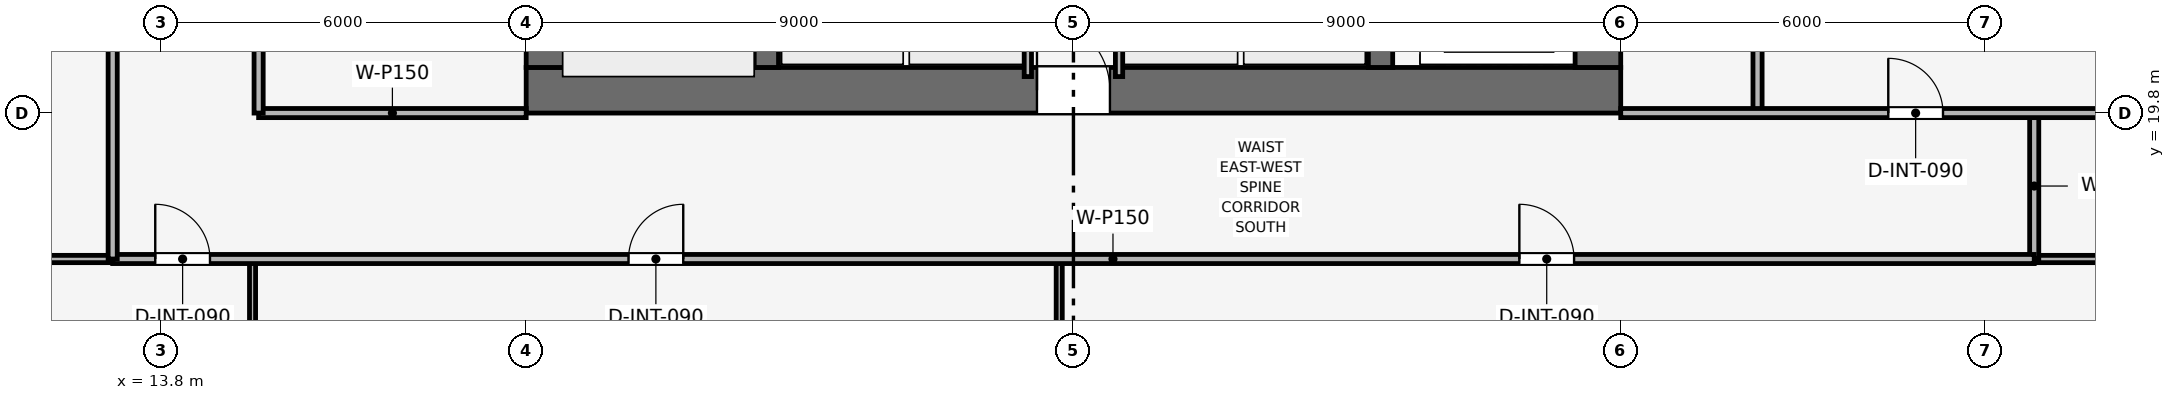
"""IFC4 building model, lengths in metres.
Left out: names, types, materials, properties, quantities, classifications, styles, units other than length and angle.
Written with IfcOpenShell. Run it as: python <this file> out.ifc"""

import sys

from ifc_helpers import new_model, si_unit, direction, frame, frame_2d, origin, place, context, subcontext, project, spatial, rectangle, extrude, element, fill, save


model = new_model("IFC4")
c1 = context("Model", 3, precision=1e-05, world=origin(), true_north=direction((0.0, 1.0)))
c2 = subcontext(c1, "Body", "Model", "MODEL_VIEW")
j1 = project(units=[si_unit("LENGTHUNIT", "METRE"), si_unit("PLANEANGLEUNIT", "RADIAN")], contexts=[c1])
p1 = place(None, origin())
s1 = spatial("IfcSite", under=j1, at=p1, CompositionType="ELEMENT")
p2 = place(p1, origin())
s2 = spatial("IfcBuilding", under=s1, at=p2, CompositionType="ELEMENT")
p3 = place(p2, frame((0.0, 0.0, 241.2)))
s3 = spatial("IfcBuildingStorey", under=s2, at=p3, CompositionType="ELEMENT", Elevation=241.2)
p4 = place(p3, frame((19.8, 20.175, 0.0), z_axis=(0.0, 0.0, 1.0), x_axis=(1.0, 0.0, 0.0)))
e1 = element("IfcWall", 1, at=p4, inside=s3, PredefinedType="SHEAR", context=c2, shape_type="SweptSolid", body=[
    extrude(rectangle(XDim=18.0, YDim=0.75, at=frame_2d((9.0, 0.0))), origin(), (0.0, 0.0, 1.0), 5.4),
])
p5 = place(p4, frame((8.4, 0.0, 0.0)))
e2 = element("IfcOpeningElement", 2, at=p5, cuts=e1, PredefinedType="OPENING", context=c2, shape_type="SweptSolid", body=[
    extrude(rectangle(XDim=1.2, YDim=2.2, at=frame_2d((0.6, 1.1))), frame((0.0, 0.385, 0.0), z_axis=(0.0, -1.0, 0.0), x_axis=(1.0, 0.0, 0.0)), (0.0, 0.0, 1.0), 0.77),
])
p6 = place(p3, frame((20.175, 20.55, 0.0), z_axis=(0.0, 0.0, 1.0), x_axis=(0.0, 1.0, 0.0)))
e3 = element("IfcWall", 3, at=p6, inside=s3, PredefinedType="SHEAR", context=c2, shape_type="SweptSolid", body=[
    extrude(rectangle(XDim=16.5, YDim=0.75, at=frame_2d((8.25, 0.0))), origin(), (0.0, 0.0, 1.0), 5.4),
])
p7 = place(p6, frame((10.25, 0.0, 0.0)))
e4 = element("IfcOpeningElement", 4, at=p7, cuts=e3, PredefinedType="OPENING", context=c2, shape_type="SweptSolid", body=[
    extrude(rectangle(XDim=1.1, YDim=2.15, at=frame_2d((0.55, 1.075))), frame((0.0, 0.385, 0.0), z_axis=(0.0, -1.0, 0.0), x_axis=(1.0, 0.0, 0.0)), (0.0, 0.0, 1.0), 0.77),
])
p8 = place(p3, frame((37.425, 20.55, 0.0), z_axis=(0.0, 0.0, 1.0), x_axis=(0.0, 1.0, 0.0)))
e5 = element("IfcWall", 5, at=p8, inside=s3, PredefinedType="SHEAR", context=c2, shape_type="SweptSolid", body=[
    extrude(rectangle(XDim=16.5, YDim=0.75, at=frame_2d((8.25, 0.0))), origin(), (0.0, 0.0, 1.0), 5.4),
])
p9 = place(p8, frame((4.75, 0.0, 0.0)))
e6 = element("IfcOpeningElement", 6, at=p9, cuts=e5, PredefinedType="OPENING", context=c2, shape_type="SweptSolid", body=[
    extrude(rectangle(XDim=1.1, YDim=2.15, at=frame_2d((0.55, 1.075))), frame((0.0, 0.385, 0.0), z_axis=(0.0, -1.0, 0.0), x_axis=(1.0, 0.0, 0.0)), (0.0, 0.0, 1.0), 0.77),
])
for number, where, z_axis, x_axis in (
    (7, (23.75, 20.55, 0.0), (0.0, 0.0, 1.0), (0.0, 1.0, 0.0)),
    (8, (33.85, 20.55, 0.0), (0.0, 0.0, 1.0), (0.0, 1.0, 0.0)),
):
    element("IfcWall", number, at=place(p3, frame(where, z_axis=z_axis, x_axis=x_axis)), inside=s3, PredefinedType="SHEAR", context=c2, shape_type="SweptSolid", body=[
        extrude(rectangle(XDim=16.5, YDim=0.4, at=frame_2d((8.25, 0.0))), origin(), (0.0, 0.0, 1.0), 5.4),
    ])
for number, where, z_axis, x_axis in (
    (9, (28.05, 20.4, 0.0), (0.0, 0.0, 1.0), (0.0, 1.0, 0.0)),
    (10, (29.55, 20.4, 0.0), (0.0, 0.0, 1.0), (0.0, 1.0, 0.0)),
):
    element("IfcWall", number, at=place(p3, frame(where, z_axis=z_axis, x_axis=x_axis)), inside=s3, PredefinedType="PARTITIONING", context=c2, shape_type="SweptSolid", body=[
        extrude(rectangle(XDim=2.75, YDim=0.12, at=frame_2d((1.375, 0.0))), origin(), (0.0, 0.0, 1.0), 5.15),
    ])
p10 = place(p3, frame((15.4, 19.8, 0.0), z_axis=(0.0, 0.0, 1.0), x_axis=(1.0, 0.0, 0.0)))
e11 = element("IfcWall", 11, at=p10, inside=s3, PredefinedType="PARTITIONING", context=c2, shape_type="SweptSolid", body=[
    extrude(rectangle(XDim=4.4, YDim=0.15, at=frame_2d((2.2, 0.0))), origin(), (0.0, 0.0, 1.0), 4.735),
])
p11 = place(p3, frame((15.4, 19.8, 0.0), z_axis=(0.0, 0.0, 1.0), x_axis=(0.0, 1.0, 0.0)))
e12 = element("IfcWall", 12, at=p11, inside=s3, PredefinedType="PARTITIONING", context=c2, shape_type="SweptSolid", body=[
    extrude(rectangle(XDim=10.35, YDim=0.15, at=frame_2d((5.175, 0.0))), origin(), (0.0, 0.0, 1.0), 4.735),
])
p12 = place(p11, frame((1.2, 0.0, 0.0)))
e13 = element("IfcOpeningElement", 13, at=p12, cuts=e12, PredefinedType="OPENING", context=c2, shape_type="SweptSolid", body=[
    extrude(rectangle(XDim=0.9, YDim=2.1, at=frame_2d((0.45, 1.05))), frame((0.0, 0.085, 0.0), z_axis=(0.0, -1.0, 0.0), x_axis=(1.0, 0.0, 0.0)), (0.0, 0.0, 1.0), 0.17),
])
p13 = place(p11, frame((4.7, 0.0, 0.0)))
e14 = element("IfcOpeningElement", 14, at=p13, cuts=e12, PredefinedType="OPENING", context=c2, shape_type="SweptSolid", body=[
    extrude(rectangle(XDim=0.9, YDim=2.1, at=frame_2d((0.45, 1.05))), frame((0.0, 0.085, 0.0), z_axis=(0.0, -1.0, 0.0), x_axis=(1.0, 0.0, 0.0)), (0.0, 0.0, 1.0), 0.17),
])
p14 = place(p11, frame((8.1, 0.0, 0.0)))
e15 = element("IfcOpeningElement", 15, at=p14, cuts=e12, PredefinedType="OPENING", context=c2, shape_type="SweptSolid", body=[
    extrude(rectangle(XDim=0.95, YDim=2.1, at=frame_2d((0.475, 1.05))), frame((0.0, 0.085, 0.0), z_axis=(0.0, -1.0, 0.0), x_axis=(1.0, 0.0, 0.0)), (0.0, 0.0, 1.0), 0.17),
])
p15 = place(p3, frame((40.05, 19.8, 0.0), z_axis=(0.0, 0.0, 1.0), x_axis=(0.0, 1.0, 0.0)))
e16 = element("IfcWall", 16, at=p15, inside=s3, PredefinedType="PARTITIONING", context=c2, shape_type="SweptSolid", body=[
    extrude(rectangle(XDim=7.05, YDim=0.15, at=frame_2d((3.525, 0.0))), origin(), (0.0, 0.0, 1.0), 4.735),
])
for number, where, z_axis, x_axis in (
    (17, (15.3, 1.93, 0.0), (0.0, 0.0, 1.0), (0.0, 1.0, 0.0)),
    (18, (28.566, 1.93, 0.0), (0.0, 0.0, 1.0), (0.0, 1.0, 0.0)),
):
    element("IfcWall", number, at=place(p3, frame(where, z_axis=z_axis, x_axis=x_axis)), inside=s3, PredefinedType="MOVABLE", context=c2, shape_type="SweptSolid", body=[
        extrude(rectangle(XDim=15.47, YDim=0.1, at=frame_2d((7.735, 0.0))), origin(), (0.0, 0.0, 1.0), 4.735),
    ])
p16 = place(p3, frame((1.93, 17.4, 0.0), z_axis=(0.0, 0.0, 1.0), x_axis=(1.0, 0.0, 0.0)))
e19 = element("IfcWall", 19, at=p16, inside=s3, PredefinedType="PARTITIONING", context=c2, shape_type="SweptSolid", body=[
    extrude(rectangle(XDim=11.07, YDim=0.12, at=frame_2d((5.535, 0.0))), origin(), (0.0, 0.0, 1.0), 4.735),
])
p17 = place(p3, frame((44.6, 17.4, 0.0), z_axis=(0.0, 0.0, 1.0), x_axis=(1.0, 0.0, 0.0)))
e20 = element("IfcWall", 20, at=p17, inside=s3, PredefinedType="PARTITIONING", context=c2, shape_type="SweptSolid", body=[
    extrude(rectangle(XDim=11.07, YDim=0.12, at=frame_2d((5.535, 0.0))), origin(), (0.0, 0.0, 1.0), 4.735),
])
p18 = place(p3, frame((44.6, 17.4, 0.0), z_axis=(0.0, 0.0, 1.0), x_axis=(0.0, 1.0, 0.0)))
e21 = element("IfcWall", 21, at=p18, inside=s3, PredefinedType="PARTITIONING", context=c2, shape_type="SweptSolid", body=[
    extrude(rectangle(XDim=2.4, YDim=0.15, at=frame_2d((1.2, 0.0))), origin(), (0.0, 0.0, 1.0), 5.15),
])
p19 = place(p3, frame((37.8, 19.8, 0.0), z_axis=(0.0, 0.0, 1.0), x_axis=(1.0, 0.0, 0.0)))
e22 = element("IfcWall", 22, at=p19, inside=s3, PredefinedType="PARTITIONING", context=c2, shape_type="SweptSolid", body=[
    extrude(rectangle(XDim=17.87, YDim=0.15, at=frame_2d((8.935, 0.0))), origin(), (0.0, 0.0, 1.0), 4.735),
])
p20 = place(p19, frame((4.4, 0.0, 0.0)))
e23 = element("IfcOpeningElement", 23, at=p20, cuts=e22, PredefinedType="OPENING", context=c2, shape_type="SweptSolid", body=[
    extrude(rectangle(XDim=0.9, YDim=2.1, at=frame_2d((0.45, 1.05))), frame((0.0, 0.085, 0.0), z_axis=(0.0, -1.0, 0.0), x_axis=(1.0, 0.0, 0.0)), (0.0, 0.0, 1.0), 0.17),
])
p21 = place(p3, frame((13.0, 17.4, 0.0), z_axis=(0.0, 0.0, 1.0), x_axis=(1.0, 0.0, 0.0)))
e24 = element("IfcWall", 24, at=p21, inside=s3, PredefinedType="PARTITIONING", context=c2, shape_type="SweptSolid", body=[
    extrude(rectangle(XDim=31.6, YDim=0.15, at=frame_2d((15.8, 0.0))), origin(), (0.0, 0.0, 1.0), 4.735),
])
p22 = place(p21, frame((0.7, 0.0, 0.0)))
e25 = element("IfcOpeningElement", 25, at=p22, cuts=e24, PredefinedType="OPENING", context=c2, shape_type="SweptSolid", body=[
    extrude(rectangle(XDim=0.9, YDim=2.1, at=frame_2d((0.45, 1.05))), frame((0.0, 0.085, 0.0), z_axis=(0.0, -1.0, 0.0), x_axis=(1.0, 0.0, 0.0)), (0.0, 0.0, 1.0), 0.17),
])
p23 = place(p21, frame((8.483, 0.0, 0.0)))
e26 = element("IfcOpeningElement", 26, at=p23, cuts=e24, PredefinedType="OPENING", context=c2, shape_type="SweptSolid", body=[
    extrude(rectangle(XDim=0.9, YDim=2.1, at=frame_2d((0.45, 1.05))), frame((0.0, 0.085, 0.0), z_axis=(0.0, -1.0, 0.0), x_axis=(1.0, 0.0, 0.0)), (0.0, 0.0, 1.0), 0.17),
])
p24 = place(p21, frame((23.133, 0.0, 0.0)))
e27 = element("IfcOpeningElement", 27, at=p24, cuts=e24, PredefinedType="OPENING", context=c2, shape_type="SweptSolid", body=[
    extrude(rectangle(XDim=0.9, YDim=2.1, at=frame_2d((0.45, 1.05))), frame((0.0, 0.085, 0.0), z_axis=(0.0, -1.0, 0.0), x_axis=(1.0, 0.0, 0.0)), (0.0, 0.0, 1.0), 0.17),
])
p25 = place(p3, frame((13.0, 17.4, 0.0), z_axis=(0.0, 0.0, 1.0), x_axis=(0.0, 1.0, 0.0)))
e28 = element("IfcWall", 28, at=p25, inside=s3, PredefinedType="PARTITIONING", context=c2, shape_type="SweptSolid", body=[
    extrude(rectangle(XDim=22.8, YDim=0.15, at=frame_2d((11.4, 0.0))), origin(), (0.0, 0.0, 1.0), 4.735),
])
p26 = place(p25, frame((10.95, 0.0, 0.0)))
e29 = element("IfcOpeningElement", 29, at=p26, cuts=e28, PredefinedType="OPENING", context=c2, shape_type="SweptSolid", body=[
    extrude(rectangle(XDim=0.9, YDim=2.1, at=frame_2d((0.45, 1.05))), frame((0.0, 0.085, 0.0), z_axis=(0.0, -1.0, 0.0), x_axis=(1.0, 0.0, 0.0)), (0.0, 0.0, 1.0), 0.17),
])
p27 = place(p20, origin())
e30 = element("IfcDoor", 30, at=p27, inside=s3, OperationType="SINGLE_SWING_LEFT", PredefinedType="DOOR", context=c2, shape_type="SweptSolid", body=[
    extrude(rectangle(XDim=0.9, YDim=2.1, at=frame_2d((0.45, 1.05))), frame((0.0, 0.025, 0.0), z_axis=(0.0, -1.0, 0.0), x_axis=(1.0, 0.0, 0.0)), (0.0, 0.0, 1.0), 0.05),
])
fill(e23, e30)
p28 = place(p22, origin())
e31 = element("IfcDoor", 31, at=p28, inside=s3, OperationType="SINGLE_SWING_LEFT", PredefinedType="DOOR", context=c2, shape_type="SweptSolid", body=[
    extrude(rectangle(XDim=0.9, YDim=2.1, at=frame_2d((0.45, 1.05))), frame((0.0, 0.025, 0.0), z_axis=(0.0, -1.0, 0.0), x_axis=(1.0, 0.0, 0.0)), (0.0, 0.0, 1.0), 0.05),
])
fill(e25, e31)
p29 = place(p23, origin())
e32 = element("IfcDoor", 32, at=p29, inside=s3, OperationType="SINGLE_SWING_RIGHT", PredefinedType="DOOR", context=c2, shape_type="SweptSolid", body=[
    extrude(rectangle(XDim=0.9, YDim=2.1, at=frame_2d((0.45, 1.05))), frame((0.0, 0.025, 0.0), z_axis=(0.0, -1.0, 0.0), x_axis=(1.0, 0.0, 0.0)), (0.0, 0.0, 1.0), 0.05),
])
fill(e26, e32)
p30 = place(p24, origin())
e33 = element("IfcDoor", 33, at=p30, inside=s3, OperationType="SINGLE_SWING_LEFT", PredefinedType="DOOR", context=c2, shape_type="SweptSolid", body=[
    extrude(rectangle(XDim=0.9, YDim=2.1, at=frame_2d((0.45, 1.05))), frame((0.0, 0.025, 0.0), z_axis=(0.0, -1.0, 0.0), x_axis=(1.0, 0.0, 0.0)), (0.0, 0.0, 1.0), 0.05),
])
fill(e27, e33)
p31 = place(p5, origin())
e34 = element("IfcDoor", 34, at=p31, inside=s3, OperationType="SINGLE_SWING_LEFT", PredefinedType="DOOR", context=c2, shape_type="SweptSolid", body=[
    extrude(rectangle(XDim=1.2, YDim=2.2, at=frame_2d((0.6, 1.1))), frame((0.0, 0.025, 0.0), z_axis=(0.0, -1.0, 0.0), x_axis=(1.0, 0.0, 0.0)), (0.0, 0.0, 1.0), 0.05),
])
fill(e2, e34)
save(model, sys.argv[1])
